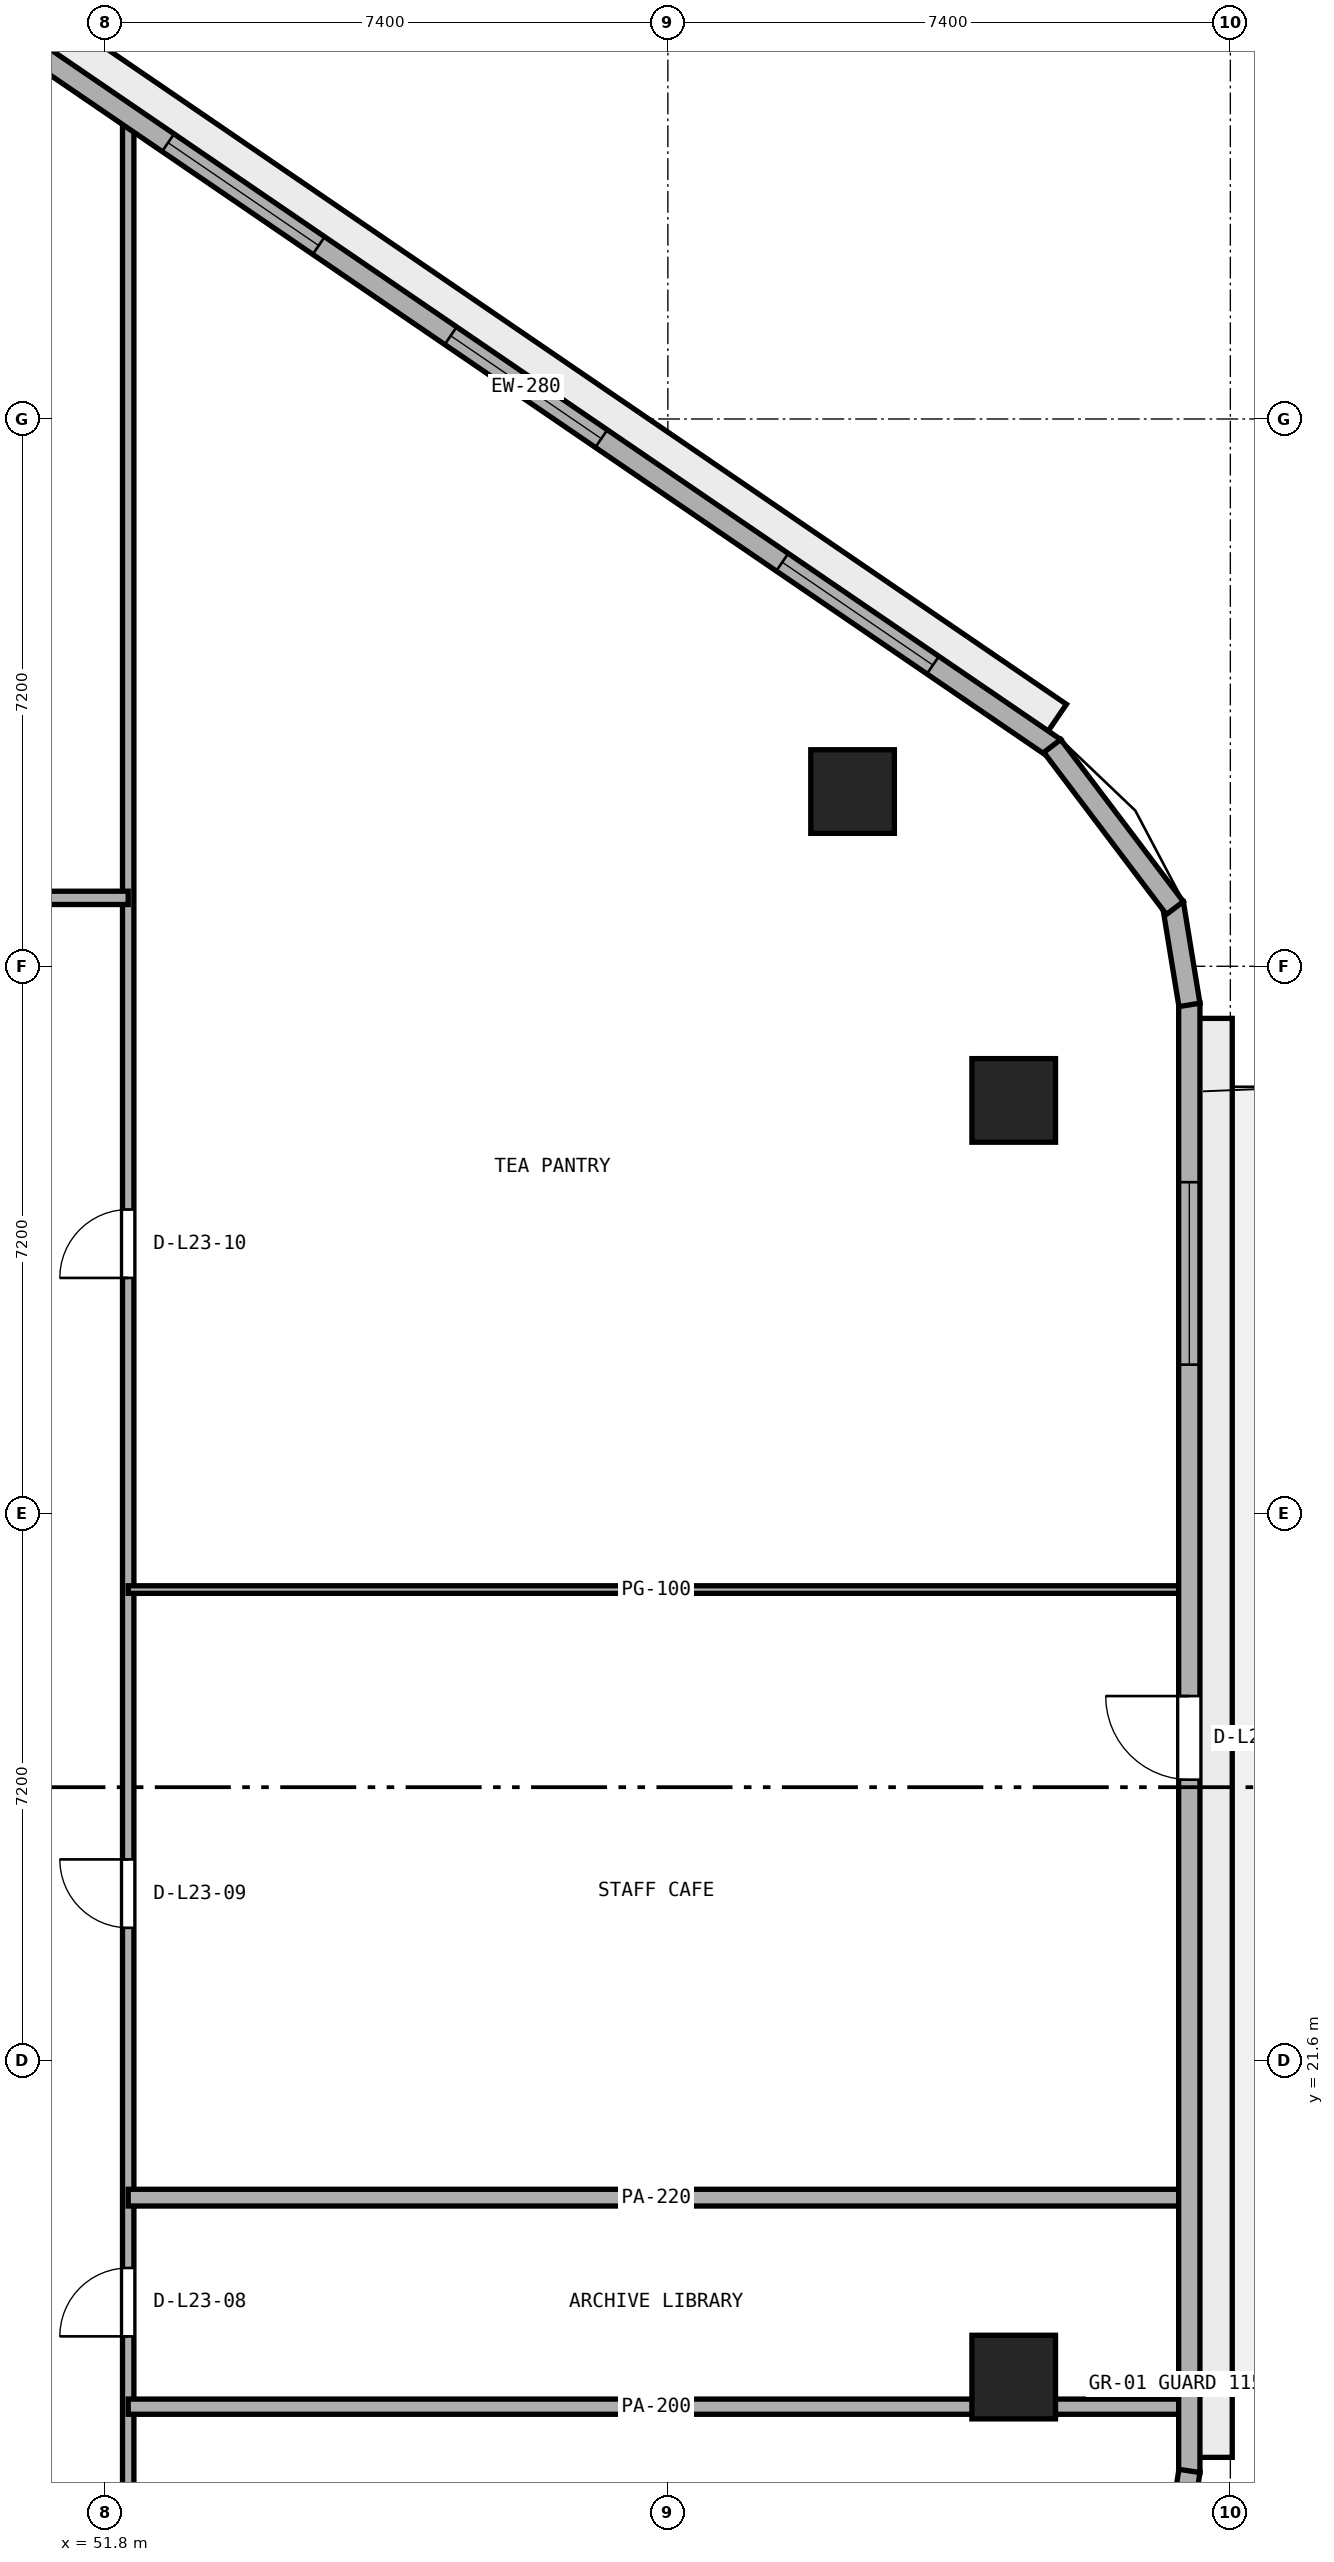
"""IFC4 building model, lengths in metres.
Left out: names, types, materials, properties, quantities, classifications, styles, units other than length and angle.
Written with IfcOpenShell. Run it as: python <this file> out.ifc"""

import sys

from ifc_helpers import new_model, si_unit, direction, frame, frame_2d, origin, origin_2d, place, context, subcontext, project, spatial, rectangle, extrude, element, fill, save


model = new_model("IFC4")
c1 = context("Model", 3, precision=1e-05, world=origin(), true_north=direction((0.0, 1.0)))
c2 = subcontext(c1, "Body", "Model", "MODEL_VIEW")
j1 = project(units=[si_unit("LENGTHUNIT", "METRE"), si_unit("PLANEANGLEUNIT", "RADIAN")], contexts=[c1])
p1 = place(None, origin())
s1 = spatial("IfcSite", under=j1, at=p1, CompositionType="ELEMENT")
p2 = place(p1, origin())
s2 = spatial("IfcBuilding", under=s1, at=p2, CompositionType="ELEMENT")
p3 = place(p2, frame((0.0, 0.0, 93.4)))
s3 = spatial("IfcBuildingStorey", under=s2, at=p3, CompositionType="ELEMENT", Elevation=93.4)
for number, where, z_axis, x_axis in (
    (1, (63.75, 17.44, 0.0), (0.0, 0.0, 1.0), (1.0, 0.0, 0.0)),
    (2, (63.75, 34.235, 0.0), (0.0, 0.0, 1.0), (1.0, 0.0, 0.0)),
    (3, (61.63, 38.299, 0.0), (0.0, 0.0, 1.0), (1.0, 0.0, 0.0)),
):
    element("IfcColumn", number, at=place(p3, frame(where, z_axis=z_axis, x_axis=x_axis)), inside=s3, PredefinedType="COLUMN", context=c2, shape_type="SweptSolid", body=[
        extrude(rectangle(XDim=1.1, YDim=1.1, at=origin_2d()), origin(), (0.0, 0.0, 1.0), 3.8),
    ])
p4 = place(p3, frame((52.1, 13.5, 0.0), z_axis=(0.0, 0.0, 1.0), x_axis=(0.0, 1.0, 0.0)))
e4 = element("IfcWall", 4, at=p4, inside=s3, PredefinedType="PARTITIONING", context=c2, shape_type="SweptSolid", body=[
    extrude(rectangle(XDim=33.723, YDim=0.15, at=frame_2d((16.861, 0.0))), origin(), (0.0, 0.0, 1.0), 3.525),
])
p5 = place(p4, frame((4.475, 0.0, 0.0)))
e5 = element("IfcOpeningElement", 5, at=p5, cuts=e4, PredefinedType="OPENING", context=c2, shape_type="SweptSolid", body=[
    extrude(rectangle(XDim=0.9, YDim=2.1, at=frame_2d((0.45, 1.05))), frame((0.0, 0.085, 0.0), z_axis=(0.0, -1.0, 0.0), x_axis=(1.0, 0.0, 0.0)), (0.0, 0.0, 1.0), 0.17),
])
p6 = place(p4, frame((9.85, 0.0, 0.0)))
e6 = element("IfcOpeningElement", 6, at=p6, cuts=e4, PredefinedType="OPENING", context=c2, shape_type="SweptSolid", body=[
    extrude(rectangle(XDim=0.9, YDim=2.1, at=frame_2d((0.45, 1.05))), frame((0.0, 0.085, 0.0), z_axis=(0.0, -1.0, 0.0), x_axis=(1.0, 0.0, 0.0)), (0.0, 0.0, 1.0), 0.17),
])
p7 = place(p4, frame((18.4, 0.0, 0.0)))
e7 = element("IfcOpeningElement", 7, at=p7, cuts=e4, PredefinedType="OPENING", context=c2, shape_type="SweptSolid", body=[
    extrude(rectangle(XDim=0.9, YDim=2.1, at=frame_2d((0.45, 1.05))), frame((0.0, 0.085, 0.0), z_axis=(0.0, -1.0, 0.0), x_axis=(1.0, 0.0, 0.0)), (0.0, 0.0, 1.0), 0.17),
])
p8 = place(p3, frame((52.1, 17.05, 0.0), z_axis=(0.0, 0.0, 1.0), x_axis=(1.0, 0.0, 0.0)))
e8 = element("IfcWall", 8, at=p8, inside=s3, PredefinedType="PARTITIONING", context=c2, shape_type="SweptSolid", body=[
    extrude(rectangle(XDim=13.895, YDim=0.2, at=frame_2d((6.948, 0.0))), origin(), (0.0, 0.0, 1.0), 3.525),
])
p9 = place(p3, frame((52.1, 19.8, 0.0), z_axis=(0.0, 0.0, 1.0), x_axis=(1.0, 0.0, 0.0)))
e9 = element("IfcWall", 9, at=p9, inside=s3, PredefinedType="PARTITIONING", context=c2, shape_type="SweptSolid", body=[
    extrude(rectangle(XDim=13.895, YDim=0.22, at=frame_2d((6.948, 0.0))), origin(), (0.0, 0.0, 1.0), 3.525),
])
p10 = place(p3, frame((52.1, 27.8, 0.0), z_axis=(0.0, 0.0, 1.0), x_axis=(1.0, 0.0, 0.0)))
e10 = element("IfcWall", 10, at=p10, inside=s3, PredefinedType="PARTITIONING", context=c2, shape_type="SweptSolid", body=[
    extrude(rectangle(XDim=13.895, YDim=0.1, at=frame_2d((6.948, 0.0))), origin(), (0.0, 0.0, 1.0), 3.525),
])
p11 = place(p3, frame((21.9, 36.9, 0.0), z_axis=(0.0, 0.0, 1.0), x_axis=(1.0, 0.0, 0.0)))
e11 = element("IfcWall", 11, at=p11, inside=s3, PredefinedType="PARTITIONING", context=c2, shape_type="SweptSolid", body=[
    extrude(rectangle(XDim=30.2, YDim=0.175, at=frame_2d((15.1, 0.0))), origin(), (0.0, 0.0, 1.0), 3.525),
])
p12 = place(p11, frame((4.87, 0.0, 0.0)))
e12 = element("IfcOpeningElement", 12, at=p12, cuts=e11, PredefinedType="OPENING", context=c2, shape_type="SweptSolid", body=[
    extrude(rectangle(XDim=1.0, YDim=2.12, at=frame_2d((0.5, 1.06))), frame((0.0, 0.097, 0.0), z_axis=(0.0, -1.0, 0.0), x_axis=(1.0, 0.0, 0.0)), (0.0, 0.0, 1.0), 0.195),
])
p13 = place(p11, frame((15.75, 0.0, 0.0)))
e13 = element("IfcOpeningElement", 13, at=p13, cuts=e11, PredefinedType="OPENING", context=c2, shape_type="SweptSolid", body=[
    extrude(rectangle(XDim=1.0, YDim=2.12, at=frame_2d((0.5, 1.06))), frame((0.0, 0.097, 0.0), z_axis=(0.0, -1.0, 0.0), x_axis=(1.0, 0.0, 0.0)), (0.0, 0.0, 1.0), 0.195),
])
p14 = place(p11, frame((25.48, 0.0, 0.0)))
e14 = element("IfcOpeningElement", 14, at=p14, cuts=e11, PredefinedType="OPENING", context=c2, shape_type="SweptSolid", body=[
    extrude(rectangle(XDim=1.0, YDim=2.12, at=frame_2d((0.5, 1.06))), frame((0.0, 0.097, 0.0), z_axis=(0.0, -1.0, 0.0), x_axis=(1.0, 0.0, 0.0)), (0.0, 0.0, 1.0), 0.195),
])
p15 = place(p3, frame((66.06, 16.183, 0.0), z_axis=(0.0, 0.0, 1.0), x_axis=(0.0, 1.0, 0.0)))
e15 = element("IfcWall", 15, at=p15, inside=s3, PredefinedType="STANDARD", context=c2, shape_type="SweptSolid", body=[
    extrude(rectangle(XDim=19.331, YDim=0.28, at=frame_2d((9.666, 0.0))), origin(), (0.0, 0.0, 1.0), 3.525),
])
p16 = place(p15, frame((9.115, 0.0, 0.0)))
e16 = element("IfcOpeningElement", 16, at=p16, cuts=e15, PredefinedType="OPENING", context=c2, shape_type="SweptSolid", body=[
    extrude(rectangle(XDim=1.1, YDim=2.2, at=frame_2d((0.55, 1.1))), frame((0.0, 0.15, 0.0), z_axis=(0.0, -1.0, 0.0), x_axis=(1.0, 0.0, 0.0)), (0.0, 0.0, 1.0), 0.3),
])
p17 = place(p15, frame((14.576, 0.0, 0.9)))
e17 = element("IfcOpeningElement", 17, at=p17, cuts=e15, PredefinedType="OPENING", context=c2, shape_type="SweptSolid", body=[
    extrude(rectangle(XDim=2.4, YDim=1.75, at=frame_2d((1.2, 0.875))), frame((0.0, 0.15, 0.0), z_axis=(0.0, -1.0, 0.0), x_axis=(1.0, 0.0, 0.0)), (0.0, 0.0, 1.0), 0.3),
])
p18 = place(p3, frame((64.29, 38.867, 0.0), z_axis=(0.0, 0.0, 1.0), x_axis=(-0.825755550159, 0.564028165416, 0.0)))
e18 = element("IfcWall", 18, at=p18, inside=s3, PredefinedType="STANDARD", context=c2, shape_type="SweptSolid", body=[
    extrude(rectangle(XDim=16.848, YDim=0.28, at=frame_2d((8.424, 0.0))), origin(), (0.0, 0.0, 1.0), 3.525),
])
p19 = place(p18, frame((1.941, 0.0, 0.9)))
e19 = element("IfcOpeningElement", 19, at=p19, cuts=e18, PredefinedType="OPENING", context=c2, shape_type="SweptSolid", body=[
    extrude(rectangle(XDim=2.4, YDim=1.75, at=frame_2d((1.2, 0.875))), frame((0.0, 0.15, 0.0), z_axis=(0.0, -1.0, 0.0), x_axis=(1.0, 0.0, 0.0)), (0.0, 0.0, 1.0), 0.3),
])
p20 = place(p18, frame((7.224, 0.0, 0.9)))
e20 = element("IfcOpeningElement", 20, at=p20, cuts=e18, PredefinedType="OPENING", context=c2, shape_type="SweptSolid", body=[
    extrude(rectangle(XDim=2.4, YDim=1.75, at=frame_2d((1.2, 0.875))), frame((0.0, 0.15, 0.0), z_axis=(0.0, -1.0, 0.0), x_axis=(1.0, 0.0, 0.0)), (0.0, 0.0, 1.0), 0.3),
])
p21 = place(p18, frame((11.727, 0.0, 0.9)))
e21 = element("IfcOpeningElement", 21, at=p21, cuts=e18, PredefinedType="OPENING", context=c2, shape_type="SweptSolid", body=[
    extrude(rectangle(XDim=2.4, YDim=1.75, at=frame_2d((1.2, 0.875))), frame((0.0, 0.15, 0.0), z_axis=(0.0, -1.0, 0.0), x_axis=(1.0, 0.0, 0.0)), (0.0, 0.0, 1.0), 0.3),
])
p22 = place(p3, frame((65.867, 14.943, 0.0), z_axis=(0.0, 0.0, 1.0), x_axis=(0.152014078361, 0.988378328364, 0.0)))
e22 = element("IfcWall", 22, at=p22, inside=s3, PredefinedType="STANDARD", context=c2, shape_type="SweptSolid", body=[
    extrude(rectangle(XDim=1.277, YDim=0.28, at=frame_2d((0.638, 0.0))), origin(), (0.0, 0.0, 1.0), 3.525),
])
p23 = place(p3, frame((66.062, 35.492, 0.0), z_axis=(0.0, 0.0, 1.0), x_axis=(-0.161182073582, 0.986924687682, 0.0)))
e23 = element("IfcWall", 23, at=p23, inside=s3, PredefinedType="STANDARD", context=c2, shape_type="SweptSolid", body=[
    extrude(rectangle(XDim=1.354, YDim=0.28, at=frame_2d((0.677, 0.0))), origin(), (0.0, 0.0, 1.0), 3.525),
])
p24 = place(p3, frame((65.87, 36.767, 0.0), z_axis=(0.0, 0.0, 1.0), x_axis=(-0.603370463754, 0.797461023166, 0.0)))
e24 = element("IfcWall", 24, at=p24, inside=s3, PredefinedType="STANDARD", context=c2, shape_type="SweptSolid", body=[
    extrude(rectangle(XDim=2.673, YDim=0.28, at=frame_2d((1.336, 0.0))), origin(), (0.0, 0.0, 1.0), 3.525),
])
p25 = place(p5, origin())
e25 = element("IfcDoor", 25, at=p25, inside=s3, OperationType="SINGLE_SWING_LEFT", PredefinedType="DOOR", context=c2, shape_type="SweptSolid", body=[
    extrude(rectangle(XDim=0.9, YDim=2.1, at=frame_2d((0.45, 1.05))), frame((0.0, 0.025, 0.0), z_axis=(0.0, -1.0, 0.0), x_axis=(1.0, 0.0, 0.0)), (0.0, 0.0, 1.0), 0.05),
])
fill(e5, e25)
p26 = place(p6, origin())
e26 = element("IfcDoor", 26, at=p26, inside=s3, OperationType="SINGLE_SWING_RIGHT", PredefinedType="DOOR", context=c2, shape_type="SweptSolid", body=[
    extrude(rectangle(XDim=0.9, YDim=2.1, at=frame_2d((0.45, 1.05))), frame((0.0, 0.025, 0.0), z_axis=(0.0, -1.0, 0.0), x_axis=(1.0, 0.0, 0.0)), (0.0, 0.0, 1.0), 0.05),
])
fill(e6, e26)
p27 = place(p7, origin())
e27 = element("IfcDoor", 27, at=p27, inside=s3, OperationType="SINGLE_SWING_LEFT", PredefinedType="DOOR", context=c2, shape_type="SweptSolid", body=[
    extrude(rectangle(XDim=0.9, YDim=2.1, at=frame_2d((0.45, 1.05))), frame((0.0, 0.025, 0.0), z_axis=(0.0, -1.0, 0.0), x_axis=(1.0, 0.0, 0.0)), (0.0, 0.0, 1.0), 0.05),
])
fill(e7, e27)
p28 = place(p16, origin())
e28 = element("IfcDoor", 28, at=p28, inside=s3, OperationType="SINGLE_SWING_RIGHT", PredefinedType="DOOR", context=c2, shape_type="SweptSolid", body=[
    extrude(rectangle(XDim=1.1, YDim=2.2, at=frame_2d((0.55, 1.1))), frame((0.0, 0.025, 0.0), z_axis=(0.0, -1.0, 0.0), x_axis=(1.0, 0.0, 0.0)), (0.0, 0.0, 1.0), 0.05),
])
fill(e16, e28)
p29 = place(p17, origin())
e29 = element("IfcWindow", 29, at=p29, inside=s3, PartitioningType="SINGLE_PANEL", PredefinedType="WINDOW", context=c2, shape_type="SweptSolid", body=[
    extrude(rectangle(XDim=2.4, YDim=1.75, at=frame_2d((1.2, 0.875))), frame((0.0, 0.03, 0.0), z_axis=(0.0, -1.0, 0.0), x_axis=(1.0, 0.0, 0.0)), (0.0, 0.0, 1.0), 0.06),
])
fill(e17, e29)
p30 = place(p19, origin())
e30 = element("IfcWindow", 30, at=p30, inside=s3, PartitioningType="SINGLE_PANEL", PredefinedType="WINDOW", context=c2, shape_type="SweptSolid", body=[
    extrude(rectangle(XDim=2.4, YDim=1.75, at=frame_2d((1.2, 0.875))), frame((0.0, 0.03, 0.0), z_axis=(0.0, -1.0, 0.0), x_axis=(1.0, 0.0, 0.0)), (0.0, 0.0, 1.0), 0.06),
])
fill(e19, e30)
p31 = place(p20, origin())
e31 = element("IfcWindow", 31, at=p31, inside=s3, PartitioningType="SINGLE_PANEL", PredefinedType="WINDOW", context=c2, shape_type="SweptSolid", body=[
    extrude(rectangle(XDim=2.4, YDim=1.75, at=frame_2d((1.2, 0.875))), frame((0.0, 0.03, 0.0), z_axis=(0.0, -1.0, 0.0), x_axis=(1.0, 0.0, 0.0)), (0.0, 0.0, 1.0), 0.06),
])
fill(e20, e31)
p32 = place(p21, origin())
e32 = element("IfcWindow", 32, at=p32, inside=s3, PartitioningType="SINGLE_PANEL", PredefinedType="WINDOW", context=c2, shape_type="SweptSolid", body=[
    extrude(rectangle(XDim=2.4, YDim=1.75, at=frame_2d((1.2, 0.875))), frame((0.0, 0.03, 0.0), z_axis=(0.0, -1.0, 0.0), x_axis=(1.0, 0.0, 0.0)), (0.0, 0.0, 1.0), 0.06),
])
fill(e21, e32)
save(model, sys.argv[1])
